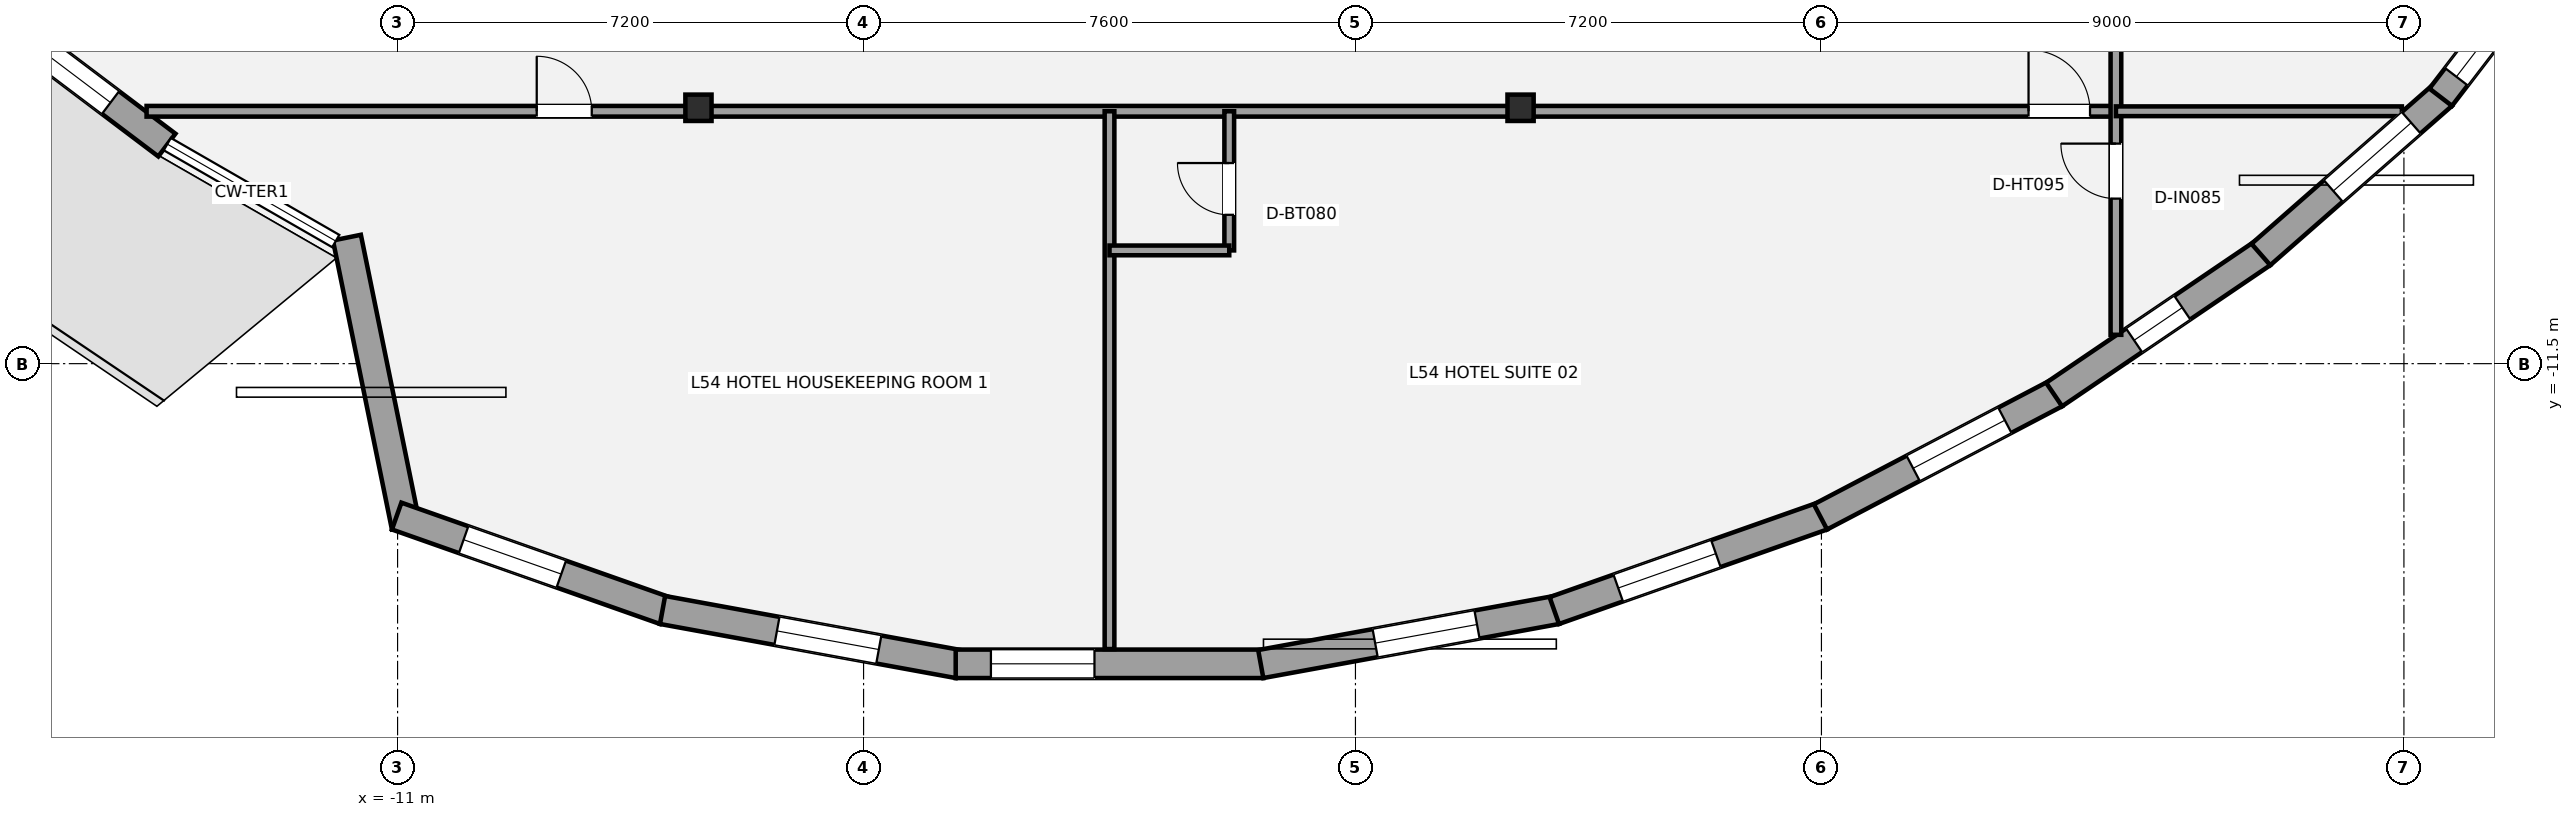
"""IFC4 building model, lengths in metres.
Left out: names, types, materials, properties, quantities, classifications, styles, units other than length and angle.
Written with IfcOpenShell. Run it as: python <this file> out.ifc"""

import sys

from ifc_helpers import new_model, si_unit, direction, frame, frame_2d, origin, origin_2d, place, context, subcontext, project, spatial, rectangle, i_section, extrude, element, fill, save


model = new_model("IFC4")
c1 = context("Model", 3, precision=1e-05, world=origin(), true_north=direction((0.0, 1.0)))
c2 = subcontext(c1, "Body", "Model", "MODEL_VIEW")
j1 = project(units=[si_unit("LENGTHUNIT", "METRE"), si_unit("PLANEANGLEUNIT", "RADIAN")], contexts=[c1])
p1 = place(None, origin())
s1 = spatial("IfcSite", under=j1, at=p1, CompositionType="ELEMENT")
p2 = place(p1, origin())
s2 = spatial("IfcBuilding", under=s1, at=p2, CompositionType="ELEMENT")
p3 = place(p2, frame((0.0, 0.0, 195.0)))
s3 = spatial("IfcBuildingStorey", under=s2, at=p3, CompositionType="ELEMENT", Elevation=195.0)
for number, where, z_axis, x_axis in (
    (1, (-6.351, -7.546, 0.0), (0.0, 0.0, 1.0), (1.0, 0.0, 0.0)),
    (2, (6.351, -7.546, 0.0), (0.0, 0.0, 1.0), (1.0, 0.0, 0.0)),
):
    element("IfcColumn", number, at=place(p3, frame(where, z_axis=z_axis, x_axis=x_axis)), inside=s3, PredefinedType="COLUMN", context=c2, shape_type="SweptSolid", body=[
        extrude(i_section(OverallWidth=0.404, OverallDepth=0.407, WebThickness=0.027, FlangeThickness=0.044, at=origin_2d()), origin(), (0.0, 0.0, 1.0), 3.2),
    ])
p4 = place(p3, frame((-14.565, -8.122, 0.0), z_axis=(0.0, 0.0, 1.0), x_axis=(-0.798309400522, 0.60224754133, 0.0)))
e3 = element("IfcWall", 3, at=p4, inside=s3, PredefinedType="STANDARD", context=c2, shape_type="SweptSolid", body=[
    extrude(rectangle(XDim=3.333, YDim=0.44, at=frame_2d((1.667, 0.0))), origin(), (0.0, 0.0, 1.0), 2.319),
])
p5 = place(p4, frame((1.09, 0.0, 0.58)))
e4 = element("IfcOpeningElement", 4, at=p5, cuts=e3, PredefinedType="OPENING", context=c2, shape_type="SweptSolid", body=[
    extrude(rectangle(XDim=1.4, YDim=1.55, at=frame_2d((0.7, 0.775))), frame((0.0, 0.23, 0.0), z_axis=(0.0, -1.0, 0.0), x_axis=(1.0, 0.0, 0.0)), (0.0, 0.0, 1.0), 0.46),
])
p6 = place(p3, frame((-10.872, -14.019, 0.0), z_axis=(0.0, 0.0, 1.0), x_axis=(-0.199894948529, 0.979817334789, 0.0)))
e5 = element("IfcWall", 5, at=p6, inside=s3, PredefinedType="STANDARD", context=c2, shape_type="SweptSolid", body=[
    extrude(rectangle(XDim=4.558, YDim=0.44, at=frame_2d((2.279, 0.0))), origin(), (0.0, 0.0, 1.0), 2.319),
])
p7 = place(p3, frame((-6.873, -15.315, 0.0), z_axis=(0.0, 0.0, 1.0), x_axis=(-0.943100102185, 0.332508943125, 0.0)))
e6 = element("IfcWall", 6, at=p7, inside=s3, PredefinedType="STANDARD", context=c2, shape_type="SweptSolid", body=[
    extrude(rectangle(XDim=4.391, YDim=0.44, at=frame_2d((2.196, 0.0))), origin(), (0.0, 0.0, 1.0), 2.315),
])
p8 = place(p7, frame((1.695, 0.0, 0.58)))
e7 = element("IfcOpeningElement", 7, at=p8, cuts=e6, PredefinedType="OPENING", context=c2, shape_type="SweptSolid", body=[
    extrude(rectangle(XDim=1.6, YDim=1.55, at=frame_2d((0.8, 0.775))), frame((0.0, 0.23, 0.0), z_axis=(0.0, -1.0, 0.0), x_axis=(1.0, 0.0, 0.0)), (0.0, 0.0, 1.0), 0.46),
])
p9 = place(p3, frame((-2.337, -16.142, 0.0), z_axis=(0.0, 0.0, 1.0), x_axis=(-0.983691132349, 0.179865939348, 0.0)))
e8 = element("IfcWall", 8, at=p9, inside=s3, PredefinedType="STANDARD", context=c2, shape_type="SweptSolid", body=[
    extrude(rectangle(XDim=4.645, YDim=0.44, at=frame_2d((2.322, 0.0))), origin(), (0.0, 0.0, 1.0), 2.315),
])
p10 = place(p9, frame((1.248, 0.0, 0.58)))
e9 = element("IfcOpeningElement", 9, at=p10, cuts=e8, PredefinedType="OPENING", context=c2, shape_type="SweptSolid", body=[
    extrude(rectangle(XDim=1.6, YDim=1.55, at=frame_2d((0.8, 0.775))), frame((0.0, 0.23, 0.0), z_axis=(0.0, -1.0, 0.0), x_axis=(1.0, 0.0, 0.0)), (0.0, 0.0, 1.0), 0.46),
])
p11 = place(p3, frame((2.376, -16.138, 0.0), z_axis=(0.0, 0.0, 1.0), x_axis=(-1.0, 0.0, 0.0)))
e10 = element("IfcWall", 10, at=p11, inside=s3, PredefinedType="STANDARD", context=c2, shape_type="SweptSolid", body=[
    extrude(rectangle(XDim=4.753, YDim=0.44, at=frame_2d((2.376, 0.0))), origin(), (0.0, 0.0, 1.0), 2.315),
])
p12 = place(p11, frame((2.609, 0.0, 0.58)))
e11 = element("IfcOpeningElement", 11, at=p12, cuts=e10, PredefinedType="OPENING", context=c2, shape_type="SweptSolid", body=[
    extrude(rectangle(XDim=1.6, YDim=1.55, at=frame_2d((0.8, 0.775))), frame((0.0, 0.23, 0.0), z_axis=(0.0, -1.0, 0.0), x_axis=(1.0, 0.0, 0.0)), (0.0, 0.0, 1.0), 0.46),
])
p13 = place(p3, frame((6.906, -15.306, 0.0), z_axis=(0.0, 0.0, 1.0), x_axis=(-0.983691132349, -0.179865939348, 0.0)))
e12 = element("IfcWall", 12, at=p13, inside=s3, PredefinedType="STANDARD", context=c2, shape_type="SweptSolid", body=[
    extrude(rectangle(XDim=4.645, YDim=0.44, at=frame_2d((2.322, 0.0))), origin(), (0.0, 0.0, 1.0), 2.315),
])
p14 = place(p13, frame((1.248, 0.0, 0.58)))
e13 = element("IfcOpeningElement", 13, at=p14, cuts=e12, PredefinedType="OPENING", context=c2, shape_type="SweptSolid", body=[
    extrude(rectangle(XDim=1.6, YDim=1.55, at=frame_2d((0.8, 0.775))), frame((0.0, 0.23, 0.0), z_axis=(0.0, -1.0, 0.0), x_axis=(1.0, 0.0, 0.0)), (0.0, 0.0, 1.0), 0.46),
])
p15 = place(p3, frame((11.014, -13.855, 0.0), z_axis=(0.0, 0.0, 1.0), x_axis=(-0.943100102185, -0.332508943125, 0.0)))
e14 = element("IfcWall", 14, at=p15, inside=s3, PredefinedType="STANDARD", context=c2, shape_type="SweptSolid", body=[
    extrude(rectangle(XDim=4.391, YDim=0.44, at=frame_2d((2.196, 0.0))), origin(), (0.0, 0.0, 1.0), 2.315),
])
p16 = place(p15, frame((1.744, 0.0, 0.58)))
e15 = element("IfcOpeningElement", 15, at=p16, cuts=e14, PredefinedType="OPENING", context=c2, shape_type="SweptSolid", body=[
    extrude(rectangle(XDim=1.6, YDim=1.55, at=frame_2d((0.8, 0.775))), frame((0.0, 0.23, 0.0), z_axis=(0.0, -1.0, 0.0), x_axis=(1.0, 0.0, 0.0)), (0.0, 0.0, 1.0), 0.46),
])
p17 = place(p3, frame((14.617, -11.964, 0.0), z_axis=(0.0, 0.0, 1.0), x_axis=(-0.885676487837, -0.464302874094, 0.0)))
e16 = element("IfcWall", 16, at=p17, inside=s3, PredefinedType="STANDARD", context=c2, shape_type="SweptSolid", body=[
    extrude(rectangle(XDim=4.1, YDim=0.44, at=frame_2d((2.05, 0.0))), origin(), (0.0, 0.0, 1.0), 2.315),
])
p18 = place(p17, frame((0.884, 0.0, 0.58)))
e17 = element("IfcOpeningElement", 17, at=p18, cuts=e16, PredefinedType="OPENING", context=c2, shape_type="SweptSolid", body=[
    extrude(rectangle(XDim=1.6, YDim=1.55, at=frame_2d((0.8, 0.775))), frame((0.0, 0.23, 0.0), z_axis=(0.0, -1.0, 0.0), x_axis=(1.0, 0.0, 0.0)), (0.0, 0.0, 1.0), 0.46),
])
p19 = place(p3, frame((17.811, -9.797, 0.0), z_axis=(0.0, 0.0, 1.0), x_axis=(-0.827704046296, -0.561164870377, 0.0)))
e18 = element("IfcWall", 18, at=p19, inside=s3, PredefinedType="STANDARD", context=c2, shape_type="SweptSolid", body=[
    extrude(rectangle(XDim=3.885, YDim=0.44, at=frame_2d((1.943, 0.0))), origin(), (0.0, 0.0, 1.0), 2.315),
])
p20 = place(p19, frame((1.493, 0.0, 0.58)))
e19 = element("IfcOpeningElement", 19, at=p20, cuts=e18, PredefinedType="OPENING", context=c2, shape_type="SweptSolid", body=[
    extrude(rectangle(XDim=0.9, YDim=1.35, at=frame_2d((0.45, 0.675))), frame((0.0, 0.23, 0.0), z_axis=(0.0, -1.0, 0.0), x_axis=(1.0, 0.0, 0.0)), (0.0, 0.0, 1.0), 0.46),
])
p21 = place(p3, frame((20.598, -7.351, 0.0), z_axis=(0.0, 0.0, 1.0), x_axis=(-0.751936480142, -0.65923556475, 0.0)))
e20 = element("IfcWall", 20, at=p21, inside=s3, PredefinedType="STANDARD", context=c2, shape_type="SweptSolid", body=[
    extrude(rectangle(XDim=3.735, YDim=0.44, at=frame_2d((1.867, 0.0))), origin(), (0.0, 0.0, 1.0), 2.315),
])
p22 = place(p21, frame((0.646, 0.0, 0.48)))
e21 = element("IfcOpeningElement", 21, at=p22, cuts=e20, PredefinedType="OPENING", context=c2, shape_type="SweptSolid", body=[
    extrude(rectangle(XDim=1.6, YDim=1.55, at=frame_2d((0.8, 0.775))), frame((0.0, 0.23, 0.0), z_axis=(0.0, -1.0, 0.0), x_axis=(1.0, 0.0, 0.0)), (0.0, 0.0, 1.0), 0.46),
])
p23 = place(p3, frame((22.722, -4.575, 0.0), z_axis=(0.0, 0.0, 1.0), x_axis=(-0.608586512644, -0.793487527708, 0.0)))
e22 = element("IfcWall", 22, at=p23, inside=s3, PredefinedType="STANDARD", context=c2, shape_type="SweptSolid", body=[
    extrude(rectangle(XDim=3.539, YDim=0.44, at=frame_2d((1.769, 0.0))), origin(), (0.0, 0.0, 1.0), 2.315),
])
p24 = place(p23, frame((1.54, 0.0, 0.58)))
e23 = element("IfcOpeningElement", 23, at=p24, cuts=e22, PredefinedType="OPENING", context=c2, shape_type="SweptSolid", body=[
    extrude(rectangle(XDim=1.6, YDim=1.55, at=frame_2d((0.8, 0.775))), frame((0.0, 0.23, 0.0), z_axis=(0.0, -1.0, 0.0), x_axis=(1.0, 0.0, 0.0)), (0.0, 0.0, 1.0), 0.46),
])
p25 = place(p3, frame((-14.878, -7.6, 0.0), z_axis=(0.0, 0.0, 1.0), x_axis=(1.0, 0.0, 0.0)))
e24 = element("IfcWall", 24, at=p25, inside=s3, PredefinedType="PARTITIONING", context=c2, shape_type="SweptSolid", body=[
    extrude(rectangle(XDim=30.428, YDim=0.165, at=frame_2d((15.214, 0.0))), origin(), (0.0, 0.0, 1.0), 2.398),
])
p26 = place(p25, frame((6.028, 0.0, 0.0)))
e25 = element("IfcOpeningElement", 25, at=p26, cuts=e24, PredefinedType="OPENING", context=c2, shape_type="SweptSolid", body=[
    extrude(rectangle(XDim=0.85, YDim=2.1, at=frame_2d((0.425, 1.05))), frame((0.0, 0.093, 0.0), z_axis=(0.0, -1.0, 0.0), x_axis=(1.0, 0.0, 0.0)), (0.0, 0.0, 1.0), 0.185),
])
p27 = place(p25, frame((29.078, 0.0, 0.0)))
e26 = element("IfcOpeningElement", 26, at=p27, cuts=e24, PredefinedType="OPENING", context=c2, shape_type="SweptSolid", body=[
    extrude(rectangle(XDim=0.95, YDim=2.15, at=frame_2d((0.475, 1.075))), frame((0.0, 0.093, 0.0), z_axis=(0.0, -1.0, 0.0), x_axis=(1.0, 0.0, 0.0)), (0.0, 0.0, 1.0), 0.185),
])
p28 = place(p3, frame((15.55, -11.054, 0.0), z_axis=(0.0, 0.0, 1.0), x_axis=(0.0, 1.0, 0.0)))
e27 = element("IfcWall", 27, at=p28, inside=s3, PredefinedType="PARTITIONING", context=c2, shape_type="SweptSolid", body=[
    extrude(rectangle(XDim=18.604, YDim=0.165, at=frame_2d((9.302, 0.0))), origin(), (0.0, 0.0, 1.0), 2.473),
])
p29 = place(p28, frame((2.104, 0.0, 0.0)))
e28 = element("IfcOpeningElement", 28, at=p29, cuts=e27, PredefinedType="OPENING", context=c2, shape_type="SweptSolid", body=[
    extrude(rectangle(XDim=0.85, YDim=2.1, at=frame_2d((0.425, 1.05))), frame((0.0, 0.093, 0.0), z_axis=(0.0, -1.0, 0.0), x_axis=(1.0, 0.0, 0.0)), (0.0, 0.0, 1.0), 0.185),
])
p30 = place(p28, frame((5.314, 0.0, 0.0)))
e29 = element("IfcOpeningElement", 29, at=p30, cuts=e27, PredefinedType="OPENING", context=c2, shape_type="SweptSolid", body=[
    extrude(rectangle(XDim=1.0, YDim=2.15, at=frame_2d((0.5, 1.075))), frame((0.0, 0.093, 0.0), z_axis=(0.0, -1.0, 0.0), x_axis=(1.0, 0.0, 0.0)), (0.0, 0.0, 1.0), 0.185),
])
p31 = place(p28, frame((11.455, 0.0, 0.0)))
e30 = element("IfcOpeningElement", 30, at=p31, cuts=e27, PredefinedType="OPENING", context=c2, shape_type="SweptSolid", body=[
    extrude(rectangle(XDim=1.0, YDim=2.15, at=frame_2d((0.5, 1.075))), frame((0.0, 0.093, 0.0), z_axis=(0.0, -1.0, 0.0), x_axis=(1.0, 0.0, 0.0)), (0.0, 0.0, 1.0), 0.185),
])
p32 = place(p28, frame((15.83, 0.0, 0.0)))
e31 = element("IfcOpeningElement", 31, at=p32, cuts=e27, PredefinedType="OPENING", context=c2, shape_type="SweptSolid", body=[
    extrude(rectangle(XDim=1.0, YDim=2.15, at=frame_2d((0.5, 1.075))), frame((0.0, 0.093, 0.0), z_axis=(0.0, -1.0, 0.0), x_axis=(1.0, 0.0, 0.0)), (0.0, 0.0, 1.0), 0.185),
])
p33 = place(p3, frame((15.55, -7.6, 0.0), z_axis=(0.0, 0.0, 1.0), x_axis=(1.0, 0.0, 0.0)))
e32 = element("IfcWall", 32, at=p33, inside=s3, PredefinedType="PLUMBINGWALL", context=c2, shape_type="SweptSolid", body=[
    extrude(rectangle(XDim=4.418, YDim=0.15, at=frame_2d((2.209, 0.0))), origin(), (0.0, 0.0, 1.0), 2.473),
])
p34 = place(p3, frame((0.0, -15.91, 0.0), z_axis=(0.0, 0.0, 1.0), x_axis=(0.0, 1.0, 0.0)))
e33 = element("IfcWall", 33, at=p34, inside=s3, PredefinedType="PLUMBINGWALL", context=c2, shape_type="SweptSolid", body=[
    extrude(rectangle(XDim=8.31, YDim=0.15, at=frame_2d((4.155, 0.0))), origin(), (0.0, 0.0, 1.0), 3.02),
])
p35 = place(p3, frame((1.85, -9.75, 0.0), z_axis=(0.0, 0.0, 1.0), x_axis=(0.0, 1.0, 0.0)))
e34 = element("IfcWall", 34, at=p35, inside=s3, PredefinedType="PLUMBINGWALL", context=c2, shape_type="SweptSolid", body=[
    extrude(rectangle(XDim=2.15, YDim=0.15, at=frame_2d((1.075, 0.0))), origin(), (0.0, 0.0, 1.0), 3.02),
])
p36 = place(p35, frame((0.55, 0.0, 0.0)))
e35 = element("IfcOpeningElement", 35, at=p36, cuts=e34, PredefinedType="OPENING", context=c2, shape_type="SweptSolid", body=[
    extrude(rectangle(XDim=0.8, YDim=2.1, at=frame_2d((0.4, 1.05))), frame((0.0, 0.085, 0.0), z_axis=(0.0, -1.0, 0.0), x_axis=(1.0, 0.0, 0.0)), (0.0, 0.0, 1.0), 0.17),
])
p37 = place(p3, frame((0.0, -9.75, 0.0), z_axis=(0.0, 0.0, 1.0), x_axis=(1.0, 0.0, 0.0)))
e36 = element("IfcWall", 36, at=p37, inside=s3, PredefinedType="PLUMBINGWALL", context=c2, shape_type="SweptSolid", body=[
    extrude(rectangle(XDim=1.85, YDim=0.15, at=frame_2d((0.925, 0.0))), origin(), (0.0, 0.0, 1.0), 3.02),
])
p38 = place(p5, origin())
e37 = element("IfcWindow", 37, at=p38, inside=s3, PartitioningType="SINGLE_PANEL", PredefinedType="WINDOW", context=c2, shape_type="SweptSolid", body=[
    extrude(rectangle(XDim=1.4, YDim=1.55, at=frame_2d((0.7, 0.775))), frame((0.0, -0.01, 0.0), z_axis=(0.0, -1.0, 0.0), x_axis=(1.0, 0.0, 0.0)), (0.0, 0.0, 1.0), 0.06),
])
fill(e4, e37)
p39 = place(p8, origin())
e38 = element("IfcWindow", 38, at=p39, inside=s3, PartitioningType="SINGLE_PANEL", PredefinedType="WINDOW", context=c2, shape_type="SweptSolid", body=[
    extrude(rectangle(XDim=1.6, YDim=1.55, at=frame_2d((0.8, 0.775))), frame((0.0, -0.01, 0.0), z_axis=(0.0, -1.0, 0.0), x_axis=(1.0, 0.0, 0.0)), (0.0, 0.0, 1.0), 0.06),
])
fill(e7, e38)
p40 = place(p10, origin())
e39 = element("IfcWindow", 39, at=p40, inside=s3, PartitioningType="SINGLE_PANEL", PredefinedType="WINDOW", context=c2, shape_type="SweptSolid", body=[
    extrude(rectangle(XDim=1.6, YDim=1.55, at=frame_2d((0.8, 0.775))), frame((0.0, -0.01, 0.0), z_axis=(0.0, -1.0, 0.0), x_axis=(1.0, 0.0, 0.0)), (0.0, 0.0, 1.0), 0.06),
])
fill(e9, e39)
p41 = place(p12, origin())
e40 = element("IfcWindow", 40, at=p41, inside=s3, PartitioningType="SINGLE_PANEL", PredefinedType="WINDOW", context=c2, shape_type="SweptSolid", body=[
    extrude(rectangle(XDim=1.6, YDim=1.55, at=frame_2d((0.8, 0.775))), frame((0.0, -0.01, 0.0), z_axis=(0.0, -1.0, 0.0), x_axis=(1.0, 0.0, 0.0)), (0.0, 0.0, 1.0), 0.06),
])
fill(e11, e40)
p42 = place(p14, origin())
e41 = element("IfcWindow", 41, at=p42, inside=s3, PartitioningType="SINGLE_PANEL", PredefinedType="WINDOW", context=c2, shape_type="SweptSolid", body=[
    extrude(rectangle(XDim=1.6, YDim=1.55, at=frame_2d((0.8, 0.775))), frame((0.0, -0.01, 0.0), z_axis=(0.0, -1.0, 0.0), x_axis=(1.0, 0.0, 0.0)), (0.0, 0.0, 1.0), 0.06),
])
fill(e13, e41)
p43 = place(p16, origin())
e42 = element("IfcWindow", 42, at=p43, inside=s3, PartitioningType="SINGLE_PANEL", PredefinedType="WINDOW", context=c2, shape_type="SweptSolid", body=[
    extrude(rectangle(XDim=1.6, YDim=1.55, at=frame_2d((0.8, 0.775))), frame((0.0, -0.01, 0.0), z_axis=(0.0, -1.0, 0.0), x_axis=(1.0, 0.0, 0.0)), (0.0, 0.0, 1.0), 0.06),
])
fill(e15, e42)
p44 = place(p18, origin())
e43 = element("IfcWindow", 43, at=p44, inside=s3, PartitioningType="SINGLE_PANEL", PredefinedType="WINDOW", context=c2, shape_type="SweptSolid", body=[
    extrude(rectangle(XDim=1.6, YDim=1.55, at=frame_2d((0.8, 0.775))), frame((0.0, -0.01, 0.0), z_axis=(0.0, -1.0, 0.0), x_axis=(1.0, 0.0, 0.0)), (0.0, 0.0, 1.0), 0.06),
])
fill(e17, e43)
p45 = place(p20, origin())
e44 = element("IfcWindow", 44, at=p45, inside=s3, PartitioningType="SINGLE_PANEL", PredefinedType="WINDOW", context=c2, shape_type="SweptSolid", body=[
    extrude(rectangle(XDim=0.9, YDim=1.35, at=frame_2d((0.45, 0.675))), frame((0.0, -0.01, 0.0), z_axis=(0.0, -1.0, 0.0), x_axis=(1.0, 0.0, 0.0)), (0.0, 0.0, 1.0), 0.06),
])
fill(e19, e44)
p46 = place(p22, origin())
e45 = element("IfcWindow", 45, at=p46, inside=s3, PartitioningType="SINGLE_PANEL", PredefinedType="WINDOW", context=c2, shape_type="SweptSolid", body=[
    extrude(rectangle(XDim=1.6, YDim=1.55, at=frame_2d((0.8, 0.775))), frame((0.0, -0.01, 0.0), z_axis=(0.0, -1.0, 0.0), x_axis=(1.0, 0.0, 0.0)), (0.0, 0.0, 1.0), 0.06),
])
fill(e21, e45)
p47 = place(p24, origin())
e46 = element("IfcWindow", 46, at=p47, inside=s3, PartitioningType="SINGLE_PANEL", PredefinedType="WINDOW", context=c2, shape_type="SweptSolid", body=[
    extrude(rectangle(XDim=1.6, YDim=1.55, at=frame_2d((0.8, 0.775))), frame((0.0, -0.01, 0.0), z_axis=(0.0, -1.0, 0.0), x_axis=(1.0, 0.0, 0.0)), (0.0, 0.0, 1.0), 0.06),
])
fill(e23, e46)
p48 = place(p29, origin())
e47 = element("IfcDoor", 47, at=p48, inside=s3, OperationType="SINGLE_SWING_RIGHT", PredefinedType="DOOR", context=c2, shape_type="SweptSolid", body=[
    extrude(rectangle(XDim=0.85, YDim=2.1, at=frame_2d((0.425, 1.05))), frame((0.0, 0.025, 0.0), z_axis=(0.0, -1.0, 0.0), x_axis=(1.0, 0.0, 0.0)), (0.0, 0.0, 1.0), 0.05),
])
fill(e28, e47)
p49 = place(p26, origin())
e48 = element("IfcDoor", 48, at=p49, inside=s3, OperationType="SINGLE_SWING_LEFT", PredefinedType="DOOR", context=c2, shape_type="SweptSolid", body=[
    extrude(rectangle(XDim=0.85, YDim=2.1, at=frame_2d((0.425, 1.05))), frame((0.0, 0.025, 0.0), z_axis=(0.0, -1.0, 0.0), x_axis=(1.0, 0.0, 0.0)), (0.0, 0.0, 1.0), 0.05),
])
fill(e25, e48)
p50 = place(p27, origin())
e49 = element("IfcDoor", 49, at=p50, inside=s3, OperationType="SINGLE_SWING_LEFT", PredefinedType="DOOR", context=c2, shape_type="SweptSolid", body=[
    extrude(rectangle(XDim=0.95, YDim=2.15, at=frame_2d((0.475, 1.075))), frame((0.0, 0.025, 0.0), z_axis=(0.0, -1.0, 0.0), x_axis=(1.0, 0.0, 0.0)), (0.0, 0.0, 1.0), 0.05),
])
fill(e26, e49)
p51 = place(p36, origin())
e50 = element("IfcDoor", 50, at=p51, inside=s3, OperationType="SINGLE_SWING_RIGHT", PredefinedType="DOOR", context=c2, shape_type="SweptSolid", body=[
    extrude(rectangle(XDim=0.8, YDim=2.1, at=frame_2d((0.4, 1.05))), frame((0.0, 0.025, 0.0), z_axis=(0.0, -1.0, 0.0), x_axis=(1.0, 0.0, 0.0)), (0.0, 0.0, 1.0), 0.05),
])
fill(e35, e50)
save(model, sys.argv[1])
